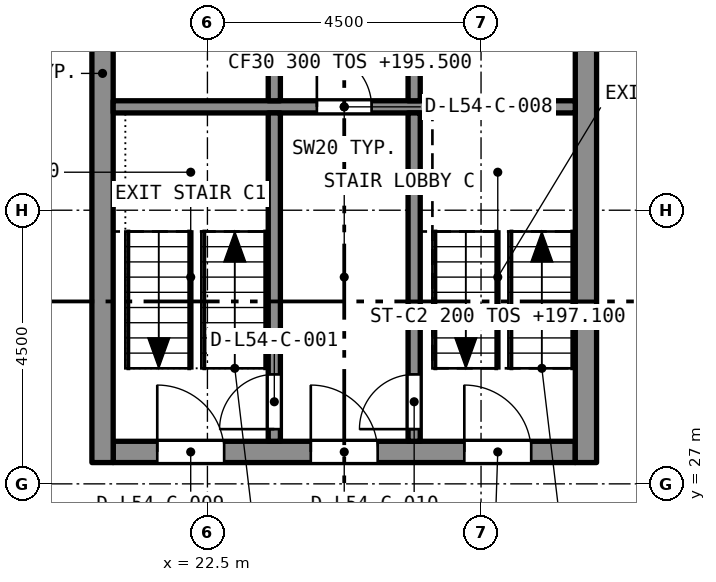
"""IFC4 building model, lengths in metres.
Left out: names, types, materials, properties, quantities, classifications, styles, units other than length and angle.
Written with IfcOpenShell. Run it as: python <this file> out.ifc"""

import sys

from ifc_helpers import new_model, si_unit, direction, frame, frame_2d, origin, place, context, subcontext, project, spatial, rectangle, extrude, element, fill, save


model = new_model("IFC4")
c1 = context("Model", 3, precision=1e-05, world=origin(), true_north=direction((0.0, 1.0)))
c2 = subcontext(c1, "Body", "Model", "MODEL_VIEW")
j1 = project(units=[si_unit("LENGTHUNIT", "METRE"), si_unit("PLANEANGLEUNIT", "RADIAN")], contexts=[c1])
p1 = place(None, origin())
s1 = spatial("IfcSite", under=j1, at=p1, CompositionType="ELEMENT")
p2 = place(p1, origin())
s2 = spatial("IfcBuilding", under=s1, at=p2, CompositionType="ELEMENT")
p3 = place(p2, frame((0.0, 0.0, 195.5)))
s3 = spatial("IfcBuildingStorey", under=s2, at=p3, CompositionType="ELEMENT", Elevation=195.5)
p4 = place(p3, frame((20.95, 27.525, 0.0), z_axis=(0.0, 0.0, 1.0), x_axis=(1.0, 0.0, 0.0)))
e1 = element("IfcWall", 1, at=p4, inside=s3, PredefinedType="SOLIDWALL", context=c2, shape_type="SweptSolid", body=[
    extrude(rectangle(XDim=7.6, YDim=0.35, at=frame_2d((3.8, 0.0))), origin(), (0.0, 0.0, 1.0), 3.2),
])
p5 = place(p4, frame((0.725, 0.0, 0.0)))
e2 = element("IfcOpeningElement", 2, at=p5, cuts=e1, PredefinedType="OPENING", context=c2, shape_type="SweptSolid", body=[
    extrude(rectangle(XDim=1.1, YDim=2.1, at=frame_2d((0.55, 1.05))), frame((0.0, 0.185, 0.0), z_axis=(0.0, -1.0, 0.0), x_axis=(1.0, 0.0, 0.0)), (0.0, 0.0, 1.0), 0.37),
])
p6 = place(p4, frame((3.25, 0.0, 0.0)))
e3 = element("IfcOpeningElement", 3, at=p6, cuts=e1, PredefinedType="OPENING", context=c2, shape_type="SweptSolid", body=[
    extrude(rectangle(XDim=1.1, YDim=2.1, at=frame_2d((0.55, 1.05))), frame((0.0, 0.185, 0.0), z_axis=(0.0, -1.0, 0.0), x_axis=(1.0, 0.0, 0.0)), (0.0, 0.0, 1.0), 0.37),
])
p7 = place(p4, frame((5.775, 0.0, 0.0)))
e4 = element("IfcOpeningElement", 4, at=p7, cuts=e1, PredefinedType="OPENING", context=c2, shape_type="SweptSolid", body=[
    extrude(rectangle(XDim=1.1, YDim=2.1, at=frame_2d((0.55, 1.05))), frame((0.0, 0.185, 0.0), z_axis=(0.0, -1.0, 0.0), x_axis=(1.0, 0.0, 0.0)), (0.0, 0.0, 1.0), 0.37),
])
p8 = place(p3, frame((20.775, 27.35, 0.0), z_axis=(0.0, 0.0, 1.0), x_axis=(0.0, 1.0, 0.0)))
e5 = element("IfcWall", 5, at=p8, inside=s3, PredefinedType="SOLIDWALL", context=c2, shape_type="SweptSolid", body=[
    extrude(rectangle(XDim=12.8, YDim=0.35, at=frame_2d((6.4, 0.0))), origin(), (0.0, 0.0, 1.0), 3.2),
])
p9 = place(p8, frame((8.6, 0.0, 0.0)))
e6 = element("IfcOpeningElement", 6, at=p9, cuts=e5, PredefinedType="OPENING", context=c2, shape_type="SweptSolid", body=[
    extrude(rectangle(XDim=1.2, YDim=2.1, at=frame_2d((0.6, 1.05))), frame((0.0, 0.185, 0.0), z_axis=(0.0, -1.0, 0.0), x_axis=(1.0, 0.0, 0.0)), (0.0, 0.0, 1.0), 0.37),
])
p10 = place(p3, frame((28.725, 27.35, 0.0), z_axis=(0.0, 0.0, 1.0), x_axis=(0.0, 1.0, 0.0)))
e7 = element("IfcWall", 7, at=p10, inside=s3, PredefinedType="SOLIDWALL", context=c2, shape_type="SweptSolid", body=[
    extrude(rectangle(XDim=12.8, YDim=0.35, at=frame_2d((6.4, 0.0))), origin(), (0.0, 0.0, 1.0), 3.2),
])
p11 = place(p10, frame((8.6, 0.0, 0.0)))
e8 = element("IfcOpeningElement", 8, at=p11, cuts=e7, PredefinedType="OPENING", context=c2, shape_type="SweptSolid", body=[
    extrude(rectangle(XDim=1.2, YDim=2.1, at=frame_2d((0.6, 1.05))), frame((0.0, 0.185, 0.0), z_axis=(0.0, -1.0, 0.0), x_axis=(1.0, 0.0, 0.0)), (0.0, 0.0, 1.0), 0.37),
])
p12 = place(p3, frame((20.95, 33.2, 0.0), z_axis=(0.0, 0.0, 1.0), x_axis=(1.0, 0.0, 0.0)))
e9 = element("IfcWall", 9, at=p12, inside=s3, PredefinedType="SOLIDWALL", context=c2, shape_type="SweptSolid", body=[
    extrude(rectangle(XDim=7.6, YDim=0.2, at=frame_2d((3.8, 0.0))), origin(), (0.0, 0.0, 1.0), 2.9),
])
p13 = place(p12, frame((3.35, 0.0, 0.0)))
e10 = element("IfcOpeningElement", 10, at=p13, cuts=e9, PredefinedType="OPENING", context=c2, shape_type="SweptSolid", body=[
    extrude(rectangle(XDim=0.9, YDim=2.1, at=frame_2d((0.45, 1.05))), frame((0.0, 0.11, 0.0), z_axis=(0.0, -1.0, 0.0), x_axis=(1.0, 0.0, 0.0)), (0.0, 0.0, 1.0), 0.22),
])
p14 = place(p3, frame((23.6, 27.7, 0.0), z_axis=(0.0, 0.0, 1.0), x_axis=(0.0, 1.0, 0.0)))
e11 = element("IfcWall", 11, at=p14, inside=s3, PredefinedType="SOLIDWALL", context=c2, shape_type="SweptSolid", body=[
    extrude(rectangle(XDim=5.4, YDim=0.2, at=frame_2d((2.7, 0.0))), origin(), (0.0, 0.0, 1.0), 2.9),
])
p15 = place(p14, frame((0.2, 0.0, 0.0)))
e12 = element("IfcOpeningElement", 12, at=p15, cuts=e11, PredefinedType="OPENING", context=c2, shape_type="SweptSolid", body=[
    extrude(rectangle(XDim=0.9, YDim=2.1, at=frame_2d((0.45, 1.05))), frame((0.0, 0.11, 0.0), z_axis=(0.0, -1.0, 0.0), x_axis=(1.0, 0.0, 0.0)), (0.0, 0.0, 1.0), 0.22),
])
p16 = place(p3, frame((25.9, 27.7, 0.0), z_axis=(0.0, 0.0, 1.0), x_axis=(0.0, 1.0, 0.0)))
e13 = element("IfcWall", 13, at=p16, inside=s3, PredefinedType="SOLIDWALL", context=c2, shape_type="SweptSolid", body=[
    extrude(rectangle(XDim=5.4, YDim=0.2, at=frame_2d((2.7, 0.0))), origin(), (0.0, 0.0, 1.0), 2.9),
])
p17 = place(p16, frame((0.2, 0.0, 0.0)))
e14 = element("IfcOpeningElement", 14, at=p17, cuts=e13, PredefinedType="OPENING", context=c2, shape_type="SweptSolid", body=[
    extrude(rectangle(XDim=0.9, YDim=2.1, at=frame_2d((0.45, 1.05))), frame((0.0, 0.11, 0.0), z_axis=(0.0, -1.0, 0.0), x_axis=(1.0, 0.0, 0.0)), (0.0, 0.0, 1.0), 0.22),
])
for number, where, z_axis, x_axis in (
    (15, (23.6, 33.3, 0.0), (0.0, 0.0, 1.0), (0.0, 1.0, 0.0)),
    (16, (25.9, 33.3, 0.0), (0.0, 0.0, 1.0), (0.0, 1.0, 0.0)),
):
    element("IfcWall", number, at=place(p3, frame(where, z_axis=z_axis, x_axis=x_axis)), inside=s3, PredefinedType="SOLIDWALL", context=c2, shape_type="SweptSolid", body=[
        extrude(rectangle(XDim=2.3, YDim=0.2, at=frame_2d((1.15, 0.0))), origin(), (0.0, 0.0, 1.0), 2.9),
    ])
p18 = place(p15, origin())
e17 = element("IfcDoor", 17, at=p18, inside=s3, OperationType="SINGLE_SWING_LEFT", PredefinedType="DOOR", context=c2, shape_type="SweptSolid", body=[
    extrude(rectangle(XDim=0.9, YDim=2.1, at=frame_2d((0.45, 1.05))), frame((0.0, 0.025, 0.0), z_axis=(0.0, -1.0, 0.0), x_axis=(1.0, 0.0, 0.0)), (0.0, 0.0, 1.0), 0.05),
])
fill(e12, e17)
p19 = place(p17, origin())
e18 = element("IfcDoor", 18, at=p19, inside=s3, OperationType="SINGLE_SWING_LEFT", PredefinedType="DOOR", context=c2, shape_type="SweptSolid", body=[
    extrude(rectangle(XDim=0.9, YDim=2.1, at=frame_2d((0.45, 1.05))), frame((0.0, 0.025, 0.0), z_axis=(0.0, -1.0, 0.0), x_axis=(1.0, 0.0, 0.0)), (0.0, 0.0, 1.0), 0.05),
])
fill(e14, e18)
p20 = place(p13, origin())
e19 = element("IfcDoor", 19, at=p20, inside=s3, OperationType="SINGLE_SWING_LEFT", PredefinedType="DOOR", context=c2, shape_type="SweptSolid", body=[
    extrude(rectangle(XDim=0.9, YDim=2.1, at=frame_2d((0.45, 1.05))), frame((0.0, 0.025, 0.0), z_axis=(0.0, -1.0, 0.0), x_axis=(1.0, 0.0, 0.0)), (0.0, 0.0, 1.0), 0.05),
])
fill(e10, e19)
p21 = place(p5, origin())
e20 = element("IfcDoor", 20, at=p21, inside=s3, OperationType="SINGLE_SWING_LEFT", PredefinedType="DOOR", context=c2, shape_type="SweptSolid", body=[
    extrude(rectangle(XDim=1.1, YDim=2.1, at=frame_2d((0.55, 1.05))), frame((0.0, 0.025, 0.0), z_axis=(0.0, -1.0, 0.0), x_axis=(1.0, 0.0, 0.0)), (0.0, 0.0, 1.0), 0.05),
])
fill(e2, e20)
p22 = place(p6, origin())
e21 = element("IfcDoor", 21, at=p22, inside=s3, OperationType="SINGLE_SWING_LEFT", PredefinedType="DOOR", context=c2, shape_type="SweptSolid", body=[
    extrude(rectangle(XDim=1.1, YDim=2.1, at=frame_2d((0.55, 1.05))), frame((0.0, 0.025, 0.0), z_axis=(0.0, -1.0, 0.0), x_axis=(1.0, 0.0, 0.0)), (0.0, 0.0, 1.0), 0.05),
])
fill(e3, e21)
p23 = place(p7, origin())
e22 = element("IfcDoor", 22, at=p23, inside=s3, OperationType="SINGLE_SWING_LEFT", PredefinedType="DOOR", context=c2, shape_type="SweptSolid", body=[
    extrude(rectangle(XDim=1.1, YDim=2.1, at=frame_2d((0.55, 1.05))), frame((0.0, 0.025, 0.0), z_axis=(0.0, -1.0, 0.0), x_axis=(1.0, 0.0, 0.0)), (0.0, 0.0, 1.0), 0.05),
])
fill(e4, e22)
save(model, sys.argv[1])
